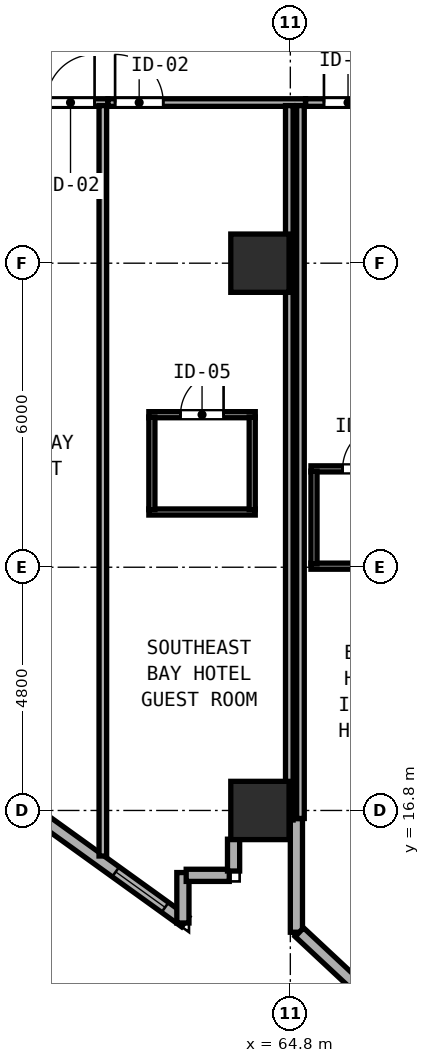
"""IFC4 building model, lengths in metres.
Left out: names, types, materials, properties, quantities, classifications, styles, units other than length and angle.
Written with IfcOpenShell. Run it as: python <this file> out.ifc"""

import sys

from ifc_helpers import new_model, si_unit, direction, frame, frame_2d, origin, origin_2d, place, context, subcontext, project, spatial, rectangle, hollow_rectangle, extrude, element, fill, save


model = new_model("IFC4")
c1 = context("Model", 3, precision=1e-05, world=origin(), true_north=direction((0.0, 1.0)))
c2 = subcontext(c1, "Body", "Model", "MODEL_VIEW")
j1 = project(units=[si_unit("LENGTHUNIT", "METRE"), si_unit("PLANEANGLEUNIT", "RADIAN")], contexts=[c1])
p1 = place(None, origin())
s1 = spatial("IfcSite", under=j1, at=p1, CompositionType="ELEMENT")
p2 = place(p1, origin())
s2 = spatial("IfcBuilding", under=s1, at=p2, CompositionType="ELEMENT")
p3 = place(p2, frame((0.0, 0.0, 78.0)))
s3 = spatial("IfcBuildingStorey", under=s2, at=p3, CompositionType="ELEMENT", Elevation=78.0)
for number, where, z_axis, x_axis in (
    (1, (64.2, 16.8, 0.0), (0.0, 0.0, 1.0), (1.0, 0.0, 0.0)),
    (2, (64.2, 27.6, 0.0), (0.0, 0.0, 1.0), (1.0, 0.0, 0.0)),
):
    element("IfcColumn", number, at=place(p3, frame(where, z_axis=z_axis, x_axis=x_axis)), inside=s3, PredefinedType="COLUMN", context=c2, shape_type="SweptSolid", body=[
        extrude(hollow_rectangle(XDim=1.15, YDim=1.15, WallThickness=0.042, at=origin_2d()), origin(), (0.0, 0.0, 1.0), 3.8),
    ])
p4 = place(p3, frame((53.367, 21.34, 0.0), z_axis=(0.0, 0.0, 1.0), x_axis=(0.811543176492, -0.58429245476, 0.0)))
e3 = element("IfcWall", 3, at=p4, inside=s3, PredefinedType="SOLIDWALL", context=c2, shape_type="SweptSolid", body=[
    extrude(rectangle(XDim=11.531, YDim=0.24, at=frame_2d((5.765, 0.0))), origin(), (0.0, 0.0, 1.0), 3.097),
])
p5 = place(p4, frame((1.6, 0.0, 0.85)))
e4 = element("IfcOpeningElement", 4, at=p5, cuts=e3, PredefinedType="OPENING", context=c2, shape_type="SweptSolid", body=[
    extrude(rectangle(XDim=1.2, YDim=1.85, at=frame_2d((0.6, 0.925))), frame((0.0, 0.13, 0.0), z_axis=(0.0, -1.0, 0.0), x_axis=(1.0, 0.0, 0.0)), (0.0, 0.0, 1.0), 0.26),
])
p6 = place(p4, frame((7.0, 0.0, 0.85)))
e5 = element("IfcOpeningElement", 5, at=p6, cuts=e3, PredefinedType="OPENING", context=c2, shape_type="SweptSolid", body=[
    extrude(rectangle(XDim=1.2, YDim=1.85, at=frame_2d((0.6, 0.925))), frame((0.0, 0.13, 0.0), z_axis=(0.0, -1.0, 0.0), x_axis=(1.0, 0.0, 0.0)), (0.0, 0.0, 1.0), 0.26),
])
p7 = place(p4, frame((9.842, 0.0, 0.85)))
e6 = element("IfcOpeningElement", 6, at=p7, cuts=e3, PredefinedType="OPENING", context=c2, shape_type="SweptSolid", body=[
    extrude(rectangle(XDim=1.2, YDim=1.85, at=frame_2d((0.6, 0.925))), frame((0.0, 0.13, 0.0), z_axis=(0.0, -1.0, 0.0), x_axis=(1.0, 0.0, 0.0)), (0.0, 0.0, 1.0), 0.26),
])
p8 = place(p3, frame((62.68, 14.579, 0.0), z_axis=(0.0, 0.0, 1.0), x_axis=(0.0, 1.0, 0.0)))
e7 = element("IfcWall", 7, at=p8, inside=s3, PredefinedType="SOLIDWALL", context=c2, shape_type="SweptSolid", body=[
    extrude(rectangle(XDim=0.996, YDim=0.24, at=frame_2d((0.498, 0.0))), origin(), (0.0, 0.0, 1.0), 3.6),
])
p9 = place(p3, frame((62.745, 15.52, 0.0), z_axis=(0.0, 0.0, 1.0), x_axis=(1.0, 0.0, 0.0)))
e8 = element("IfcWall", 8, at=p9, inside=s3, PredefinedType="SOLIDWALL", context=c2, shape_type="SweptSolid", body=[
    extrude(rectangle(XDim=0.85, YDim=0.24, at=frame_2d((0.425, 0.0))), origin(), (0.0, 0.0, 1.0), 3.6),
])
p10 = place(p3, frame((63.68, 15.605, 0.0), z_axis=(0.0, 0.0, 1.0), x_axis=(0.0, 1.0, 0.0)))
e9 = element("IfcWall", 9, at=p10, inside=s3, PredefinedType="SOLIDWALL", context=c2, shape_type="SweptSolid", body=[
    extrude(rectangle(XDim=0.628, YDim=0.24, at=frame_2d((0.314, 0.0))), origin(), (0.0, 0.0, 1.0), 3.6),
])
p11 = place(p3, frame((64.92, 16.64, 0.0), z_axis=(0.0, 0.0, 1.0), x_axis=(0.0, -1.0, 0.0)))
e10 = element("IfcWall", 10, at=p11, inside=s3, PredefinedType="SOLIDWALL", context=c2, shape_type="SweptSolid", body=[
    extrude(rectangle(XDim=2.243, YDim=0.24, at=frame_2d((1.121, 0.0))), origin(), (0.0, 0.0, 1.0), 3.6),
])
p12 = place(p3, frame((64.979, 14.397, 0.0), z_axis=(0.0, 0.0, 1.0), x_axis=(0.731053894258, -0.682319722484, 0.0)))
e11 = element("IfcWall", 11, at=p12, inside=s3, PredefinedType="SOLIDWALL", context=c2, shape_type="SweptSolid", body=[
    extrude(rectangle(XDim=11.818, YDim=0.24, at=frame_2d((5.909, 0.0))), origin(), (0.0, 0.0, 1.0), 3.6),
])
p13 = place(p12, frame((1.6, 0.0, 0.85)))
e12 = element("IfcOpeningElement", 12, at=p13, cuts=e11, PredefinedType="OPENING", context=c2, shape_type="SweptSolid", body=[
    extrude(rectangle(XDim=1.2, YDim=1.85, at=frame_2d((0.6, 0.925))), frame((0.0, 0.13, 0.0), z_axis=(0.0, -1.0, 0.0), x_axis=(1.0, 0.0, 0.0)), (0.0, 0.0, 1.0), 0.26),
])
p14 = place(p12, frame((7.0, 0.0, 0.85)))
e13 = element("IfcOpeningElement", 13, at=p14, cuts=e11, PredefinedType="OPENING", context=c2, shape_type="SweptSolid", body=[
    extrude(rectangle(XDim=1.2, YDim=1.85, at=frame_2d((0.6, 0.925))), frame((0.0, 0.13, 0.0), z_axis=(0.0, -1.0, 0.0), x_axis=(1.0, 0.0, 0.0)), (0.0, 0.0, 1.0), 0.26),
])
p15 = place(p3, frame((73.388, 31.079, 0.0), z_axis=(0.0, 0.0, 1.0), x_axis=(-0.963197271032, 0.268795493036, 0.0)))
e14 = element("IfcWall", 14, at=p15, inside=s3, PredefinedType="SOLIDWALL", context=c2, shape_type="SweptSolid", body=[
    extrude(rectangle(XDim=9.095, YDim=0.24, at=frame_2d((4.548, 0.0))), origin(), (0.0, 0.0, 1.0), 3.6),
])
p16 = place(p15, frame((1.6, 0.0, 0.85)))
e15 = element("IfcOpeningElement", 15, at=p16, cuts=e14, PredefinedType="OPENING", context=c2, shape_type="SweptSolid", body=[
    extrude(rectangle(XDim=1.2, YDim=1.85, at=frame_2d((0.6, 0.925))), frame((0.0, 0.13, 0.0), z_axis=(0.0, -1.0, 0.0), x_axis=(1.0, 0.0, 0.0)), (0.0, 0.0, 1.0), 0.26),
])
p17 = place(p15, frame((7.0, 0.0, 0.85)))
e16 = element("IfcOpeningElement", 16, at=p17, cuts=e14, PredefinedType="OPENING", context=c2, shape_type="SweptSolid", body=[
    extrude(rectangle(XDim=1.2, YDim=1.85, at=frame_2d((0.6, 0.925))), frame((0.0, 0.13, 0.0), z_axis=(0.0, -1.0, 0.0), x_axis=(1.0, 0.0, 0.0)), (0.0, 0.0, 1.0), 0.26),
])
p18 = place(p3, frame((57.052, 30.77, 0.0), z_axis=(0.0, 0.0, 1.0), x_axis=(1.0, 0.0, 0.0)))
e17 = element("IfcWall", 17, at=p18, inside=s3, PredefinedType="PARTITIONING", context=c2, shape_type="SweptSolid", body=[
    extrude(rectangle(XDim=4.148, YDim=0.15, at=frame_2d((2.074, 0.0))), origin(), (0.0, 0.0, 1.0), 3.6),
])
p19 = place(p18, frame((3.885, 0.0, 0.0), z_axis=(0.0, 0.0, 1.0), x_axis=(-1.0, 0.0, 0.0)))
e18 = element("IfcOpeningElement", 18, at=p19, cuts=e17, PredefinedType="OPENING", context=c2, shape_type="SweptSolid", body=[
    extrude(rectangle(XDim=0.95, YDim=2.15, at=frame_2d((0.475, 1.075))), frame((0.0, 0.085, 0.0), z_axis=(0.0, -1.0, 0.0), x_axis=(1.0, 0.0, 0.0)), (0.0, 0.0, 1.0), 0.17),
])
p20 = place(p3, frame((61.1, 15.901, 0.0), z_axis=(0.0, 0.0, 1.0), x_axis=(0.0, 1.0, 0.0)))
e19 = element("IfcWall", 19, at=p20, inside=s3, PredefinedType="PARTITIONING", context=c2, shape_type="SweptSolid", body=[
    extrude(rectangle(XDim=14.809, YDim=0.15, at=frame_2d((7.404, 0.0))), origin(), (0.0, 0.0, 1.0), 3.6),
])
p21 = place(p3, frame((61.202, 30.77, 0.0), z_axis=(0.0, 0.0, 1.0), x_axis=(1.0, 0.0, 0.0)))
e20 = element("IfcWall", 20, at=p21, inside=s3, PredefinedType="PARTITIONING", context=c2, shape_type="SweptSolid", body=[
    extrude(rectangle(XDim=3.898, YDim=0.15, at=frame_2d((1.949, 0.0))), origin(), (0.0, 0.0, 1.0), 3.6),
])
p22 = place(p21, frame((1.09, 0.0, 0.0), z_axis=(0.0, 0.0, 1.0), x_axis=(-1.0, 0.0, 0.0)))
e21 = element("IfcOpeningElement", 21, at=p22, cuts=e20, PredefinedType="OPENING", context=c2, shape_type="SweptSolid", body=[
    extrude(rectangle(XDim=0.95, YDim=2.15, at=frame_2d((0.475, 1.075))), frame((0.0, 0.085, 0.0), z_axis=(0.0, -1.0, 0.0), x_axis=(1.0, 0.0, 0.0)), (0.0, 0.0, 1.0), 0.17),
])
p23 = place(p3, frame((65.0, 16.642, 0.0), z_axis=(0.0, 0.0, 1.0), x_axis=(0.0, 1.0, 0.0)))
e22 = element("IfcWall", 22, at=p23, inside=s3, PredefinedType="PARTITIONING", context=c2, shape_type="SweptSolid", body=[
    extrude(rectangle(XDim=14.068, YDim=0.15, at=frame_2d((7.034, 0.0))), origin(), (0.0, 0.0, 1.0), 3.6),
])
p24 = place(p3, frame((62.008, 24.61, 0.0), z_axis=(0.0, 0.0, 1.0), x_axis=(1.0, 0.0, 0.0)))
e23 = element("IfcWall", 23, at=p24, inside=s3, PredefinedType="PARTITIONING", context=c2, shape_type="SweptSolid", body=[
    extrude(rectangle(XDim=2.1, YDim=0.12, at=frame_2d((1.05, 0.0))), origin(), (0.0, 0.0, 1.0), 3.6),
])
p25 = place(p24, frame((1.475, 0.0, 0.0), z_axis=(0.0, 0.0, 1.0), x_axis=(-1.0, 0.0, 0.0)))
e24 = element("IfcOpeningElement", 24, at=p25, cuts=e23, PredefinedType="OPENING", context=c2, shape_type="SweptSolid", body=[
    extrude(rectangle(XDim=0.85, YDim=2.1, at=frame_2d((0.425, 1.05))), frame((0.0, 0.07, 0.0), z_axis=(0.0, -1.0, 0.0), x_axis=(1.0, 0.0, 0.0)), (0.0, 0.0, 1.0), 0.14),
])
p26 = place(p3, frame((62.008, 22.69, 0.0), z_axis=(0.0, 0.0, 1.0), x_axis=(1.0, 0.0, 0.0)))
e25 = element("IfcWall", 25, at=p26, inside=s3, PredefinedType="PARTITIONING", context=c2, shape_type="SweptSolid", body=[
    extrude(rectangle(XDim=2.1, YDim=0.12, at=frame_2d((1.05, 0.0))), origin(), (0.0, 0.0, 1.0), 3.6),
])
p27 = place(p3, frame((62.068, 22.735, 0.0), z_axis=(0.0, 0.0, 1.0), x_axis=(0.0, 1.0, 0.0)))
e26 = element("IfcWall", 26, at=p27, inside=s3, PredefinedType="PARTITIONING", context=c2, shape_type="SweptSolid", body=[
    extrude(rectangle(XDim=1.83, YDim=0.12, at=frame_2d((0.915, 0.0))), origin(), (0.0, 0.0, 1.0), 3.6),
])
p28 = place(p3, frame((64.048, 22.735, 0.0), z_axis=(0.0, 0.0, 1.0), x_axis=(0.0, 1.0, 0.0)))
e27 = element("IfcWall", 27, at=p28, inside=s3, PredefinedType="PARTITIONING", context=c2, shape_type="SweptSolid", body=[
    extrude(rectangle(XDim=1.83, YDim=0.12, at=frame_2d((0.915, 0.0))), origin(), (0.0, 0.0, 1.0), 3.097),
])
p29 = place(p3, frame((65.102, 30.77, 0.0), z_axis=(0.0, 0.0, 1.0), x_axis=(1.0, 0.0, 0.0)))
e28 = element("IfcWall", 28, at=p29, inside=s3, PredefinedType="PARTITIONING", context=c2, shape_type="SweptSolid", body=[
    extrude(rectangle(XDim=2.498, YDim=0.15, at=frame_2d((1.249, 0.0))), origin(), (0.0, 0.0, 1.0), 3.6),
])
p30 = place(p29, frame((1.312, 0.0, 0.0), z_axis=(0.0, 0.0, 1.0), x_axis=(-1.0, 0.0, 0.0)))
e29 = element("IfcOpeningElement", 29, at=p30, cuts=e28, PredefinedType="OPENING", context=c2, shape_type="SweptSolid", body=[
    extrude(rectangle(XDim=0.95, YDim=2.15, at=frame_2d((0.475, 1.075))), frame((0.0, 0.085, 0.0), z_axis=(0.0, -1.0, 0.0), x_axis=(1.0, 0.0, 0.0)), (0.0, 0.0, 1.0), 0.17),
])
p31 = place(p3, frame((64.78, 16.612, 0.0), z_axis=(0.0, 0.0, 1.0), x_axis=(0.0, 1.0, 0.0)))
e30 = element("IfcWall", 30, at=p31, inside=s3, PredefinedType="PARTITIONING", context=c2, shape_type="SweptSolid", body=[
    extrude(rectangle(XDim=14.098, YDim=0.15, at=frame_2d((7.049, 0.0))), origin(), (0.0, 0.0, 1.0), 3.6),
])
p32 = place(p3, frame((65.207, 23.541, 0.0), z_axis=(0.0, 0.0, 1.0), x_axis=(1.0, 0.0, 0.0)))
e31 = element("IfcWall", 31, at=p32, inside=s3, PredefinedType="PARTITIONING", context=c2, shape_type="SweptSolid", body=[
    extrude(rectangle(XDim=2.1, YDim=0.12, at=frame_2d((1.05, 0.0))), origin(), (0.0, 0.0, 1.0), 3.6),
])
p33 = place(p32, frame((1.475, 0.0, 0.0), z_axis=(0.0, 0.0, 1.0), x_axis=(-1.0, 0.0, 0.0)))
e32 = element("IfcOpeningElement", 32, at=p33, cuts=e31, PredefinedType="OPENING", context=c2, shape_type="SweptSolid", body=[
    extrude(rectangle(XDim=0.85, YDim=2.1, at=frame_2d((0.425, 1.05))), frame((0.0, 0.07, 0.0), z_axis=(0.0, -1.0, 0.0), x_axis=(1.0, 0.0, 0.0)), (0.0, 0.0, 1.0), 0.14),
])
p34 = place(p3, frame((65.207, 21.621, 0.0), z_axis=(0.0, 0.0, 1.0), x_axis=(1.0, 0.0, 0.0)))
e33 = element("IfcWall", 33, at=p34, inside=s3, PredefinedType="PARTITIONING", context=c2, shape_type="SweptSolid", body=[
    extrude(rectangle(XDim=2.1, YDim=0.12, at=frame_2d((1.05, 0.0))), origin(), (0.0, 0.0, 1.0), 3.6),
])
p35 = place(p3, frame((65.267, 21.666, 0.0), z_axis=(0.0, 0.0, 1.0), x_axis=(0.0, 1.0, 0.0)))
e34 = element("IfcWall", 34, at=p35, inside=s3, PredefinedType="PARTITIONING", context=c2, shape_type="SweptSolid", body=[
    extrude(rectangle(XDim=1.83, YDim=0.12, at=frame_2d((0.915, 0.0))), origin(), (0.0, 0.0, 1.0), 3.6),
])
p36 = place(p19, origin())
e35 = element("IfcDoor", 35, at=p36, inside=s3, OperationType="SINGLE_SWING_LEFT", PredefinedType="DOOR", context=c2, shape_type="SweptSolid", body=[
    extrude(rectangle(XDim=0.95, YDim=2.15, at=frame_2d((0.475, 1.075))), frame((0.0, 0.025, 0.0), z_axis=(0.0, -1.0, 0.0), x_axis=(1.0, 0.0, 0.0)), (0.0, 0.0, 1.0), 0.05),
])
fill(e18, e35)
p37 = place(p22, origin())
e36 = element("IfcDoor", 36, at=p37, inside=s3, OperationType="SINGLE_SWING_RIGHT", PredefinedType="DOOR", context=c2, shape_type="SweptSolid", body=[
    extrude(rectangle(XDim=0.95, YDim=2.15, at=frame_2d((0.475, 1.075))), frame((0.0, 0.025, 0.0), z_axis=(0.0, -1.0, 0.0), x_axis=(1.0, 0.0, 0.0)), (0.0, 0.0, 1.0), 0.05),
])
fill(e21, e36)
p38 = place(p25, origin())
e37 = element("IfcDoor", 37, at=p38, inside=s3, OperationType="SINGLE_SWING_LEFT", PredefinedType="DOOR", context=c2, shape_type="SweptSolid", body=[
    extrude(rectangle(XDim=0.85, YDim=2.1, at=frame_2d((0.425, 1.05))), frame((0.0, 0.025, 0.0), z_axis=(0.0, -1.0, 0.0), x_axis=(1.0, 0.0, 0.0)), (0.0, 0.0, 1.0), 0.05),
])
fill(e24, e37)
p39 = place(p30, origin())
e38 = element("IfcDoor", 38, at=p39, inside=s3, OperationType="SINGLE_SWING_RIGHT", PredefinedType="DOOR", context=c2, shape_type="SweptSolid", body=[
    extrude(rectangle(XDim=0.95, YDim=2.15, at=frame_2d((0.475, 1.075))), frame((0.0, 0.025, 0.0), z_axis=(0.0, -1.0, 0.0), x_axis=(1.0, 0.0, 0.0)), (0.0, 0.0, 1.0), 0.05),
])
fill(e29, e38)
p40 = place(p33, origin())
e39 = element("IfcDoor", 39, at=p40, inside=s3, OperationType="SINGLE_SWING_LEFT", PredefinedType="DOOR", context=c2, shape_type="SweptSolid", body=[
    extrude(rectangle(XDim=0.85, YDim=2.1, at=frame_2d((0.425, 1.05))), frame((0.0, 0.025, 0.0), z_axis=(0.0, -1.0, 0.0), x_axis=(1.0, 0.0, 0.0)), (0.0, 0.0, 1.0), 0.05),
])
fill(e32, e39)
p41 = place(p7, origin())
e40 = element("IfcWindow", 40, at=p41, inside=s3, PartitioningType="SINGLE_PANEL", PredefinedType="WINDOW", context=c2, shape_type="SweptSolid", body=[
    extrude(rectangle(XDim=1.2, YDim=1.85, at=frame_2d((0.6, 0.925))), frame((0.0, 0.03, 0.0), z_axis=(0.0, -1.0, 0.0), x_axis=(1.0, 0.0, 0.0)), (0.0, 0.0, 1.0), 0.06),
])
fill(e6, e40)
save(model, sys.argv[1])
